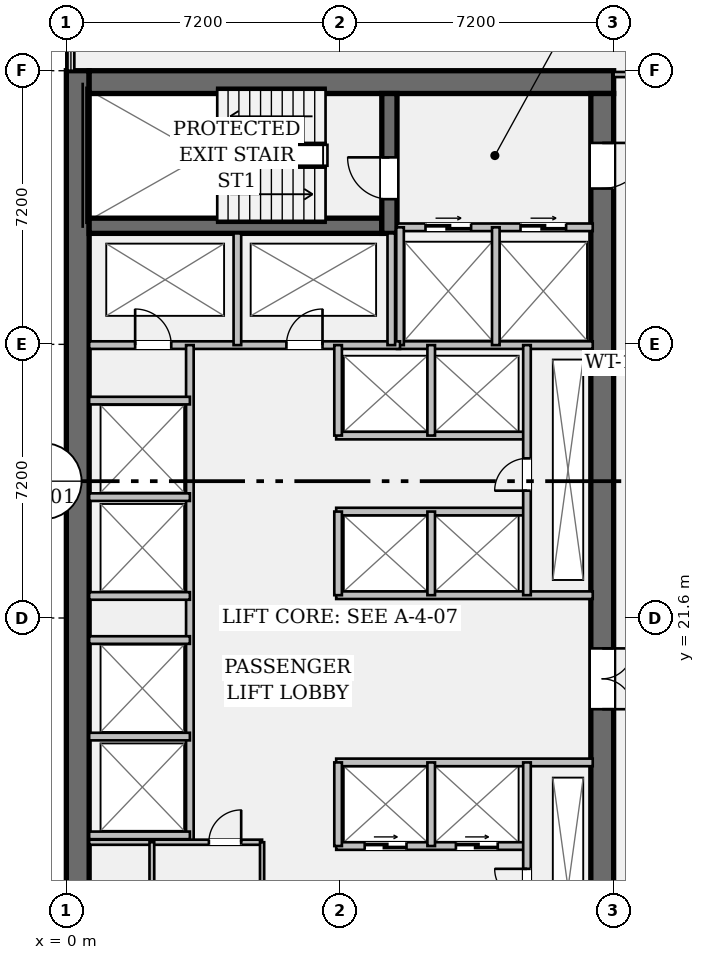
"""IFC4 building model, lengths in metres.
Left out: names, types, materials, properties, quantities, classifications, styles, units other than length and angle.
Written with IfcOpenShell. Run it as: python <this file> out.ifc"""

import sys

from ifc_helpers import new_model, si_unit, direction, frame, frame_2d, origin, place, context, subcontext, project, spatial, rectangle, extrude, element, fill, save


model = new_model("IFC4")
c1 = context("Model", 3, precision=1e-05, world=origin(), true_north=direction((0.0, 1.0)))
c2 = subcontext(c1, "Body", "Model", "MODEL_VIEW")
j1 = project(units=[si_unit("LENGTHUNIT", "METRE"), si_unit("PLANEANGLEUNIT", "RADIAN")], contexts=[c1])
p1 = place(None, origin())
s1 = spatial("IfcSite", under=j1, at=p1, CompositionType="ELEMENT")
p2 = place(p1, origin())
s2 = spatial("IfcBuilding", under=s1, at=p2, CompositionType="ELEMENT")
p3 = place(p2, frame((0.0, 0.0, 102.2)))
s3 = spatial("IfcBuildingStorey", under=s2, at=p3, CompositionType="ELEMENT", Elevation=102.2)
p4 = place(p3, frame((0.3, 7.2, 0.0), z_axis=(0.0, 0.0, 1.0), x_axis=(0.0, 1.0, 0.0)))
e1 = element("IfcWall", 1, at=p4, inside=s3, PredefinedType="SHEAR", context=c2, shape_type="SweptSolid", body=[
    extrude(rectangle(XDim=28.8, YDim=0.6, at=frame_2d((14.4, 0.0))), origin(), (0.0, 0.0, 1.0), 3.58),
])
p5 = place(p3, frame((0.6, 35.7, 0.0), z_axis=(0.0, 0.0, 1.0), x_axis=(1.0, 0.0, 0.0)))
e2 = element("IfcWall", 2, at=p5, inside=s3, PredefinedType="SHEAR", context=c2, shape_type="SweptSolid", body=[
    extrude(rectangle(XDim=13.8, YDim=0.6, at=frame_2d((6.9, 0.0))), origin(), (0.0, 0.0, 1.0), 3.58),
])
p6 = place(p3, frame((14.1, 35.4, 0.0), z_axis=(0.0, 0.0, 1.0), x_axis=(0.0, -1.0, 0.0)))
e3 = element("IfcWall", 3, at=p6, inside=s3, PredefinedType="SHEAR", context=c2, shape_type="SweptSolid", body=[
    extrude(rectangle(XDim=27.6, YDim=0.6, at=frame_2d((13.8, 0.0))), origin(), (0.0, 0.0, 1.0), 3.58),
])
p7 = place(p6, frame((1.3, 0.0, 0.0)))
e4 = element("IfcOpeningElement", 4, at=p7, cuts=e3, PredefinedType="OPENING", context=c2, shape_type="SweptSolid", body=[
    extrude(rectangle(XDim=1.2, YDim=2.15, at=frame_2d((0.6, 1.075))), frame((0.0, 0.312, 0.0), z_axis=(0.0, -1.0, 0.0), x_axis=(1.0, 0.0, 0.0)), (0.0, 0.0, 1.0), 0.624),
])
p8 = place(p6, frame((25.25, 0.0, 0.0)))
e5 = element("IfcOpeningElement", 5, at=p8, cuts=e3, PredefinedType="OPENING", context=c2, shape_type="SweptSolid", body=[
    extrude(rectangle(XDim=1.2, YDim=2.15, at=frame_2d((0.6, 1.075))), frame((0.0, 0.312, 0.0), z_axis=(0.0, -1.0, 0.0), x_axis=(1.0, 0.0, 0.0)), (0.0, 0.0, 1.0), 0.624),
])
p9 = place(p6, frame((14.6, 0.0, 0.0)))
e6 = element("IfcOpeningElement", 6, at=p9, cuts=e3, PredefinedType="OPENING", context=c2, shape_type="SweptSolid", body=[
    extrude(rectangle(XDim=1.6, YDim=2.2, at=frame_2d((0.8, 1.1))), frame((0.0, 0.312, 0.0), z_axis=(0.0, -1.0, 0.0), x_axis=(1.0, 0.0, 0.0)), (0.0, 0.0, 1.0), 0.624),
])
p10 = place(p3, frame((0.6, 31.92, 0.0), z_axis=(0.0, 0.0, 1.0), x_axis=(1.0, 0.0, 0.0)))
e7 = element("IfcWall", 7, at=p10, inside=s3, PredefinedType="SHEAR", context=c2, shape_type="SweptSolid", body=[
    extrude(rectangle(XDim=7.7, YDim=0.4, at=frame_2d((3.85, 0.0))), origin(), (0.0, 0.0, 1.0), 3.58),
])
p11 = place(p3, frame((8.5, 31.72, 0.0), z_axis=(0.0, 0.0, 1.0), x_axis=(0.0, 1.0, 0.0)))
e8 = element("IfcWall", 8, at=p11, inside=s3, PredefinedType="SHEAR", context=c2, shape_type="SweptSolid", body=[
    extrude(rectangle(XDim=3.68, YDim=0.4, at=frame_2d((1.84, 0.0))), origin(), (0.0, 0.0, 1.0), 3.58),
])
p12 = place(p11, frame((0.9, 0.0, 0.0)))
e9 = element("IfcOpeningElement", 9, at=p12, cuts=e8, PredefinedType="OPENING", context=c2, shape_type="SweptSolid", body=[
    extrude(rectangle(XDim=1.1, YDim=2.15, at=frame_2d((0.55, 1.075))), frame((0.0, 0.212, 0.0), z_axis=(0.0, -1.0, 0.0), x_axis=(1.0, 0.0, 0.0)), (0.0, 0.0, 1.0), 0.424),
])
p13 = place(p3, frame((8.7, 31.88, 0.0), z_axis=(0.0, 0.0, 1.0), x_axis=(1.0, 0.0, 0.0)))
e10 = element("IfcWall", 10, at=p13, inside=s3, PredefinedType="PARTITIONING", context=c2, shape_type="SweptSolid", body=[
    extrude(rectangle(XDim=5.15, YDim=0.2, at=frame_2d((2.575, 0.0))), origin(), (0.0, 0.0, 1.0), 3.58),
])
p14 = place(p13, frame((0.75, 0.0, 0.0)))
e11 = element("IfcOpeningElement", 11, at=p14, cuts=e10, PredefinedType="OPENING", context=c2, shape_type="SweptSolid", body=[
    extrude(rectangle(XDim=1.2, YDim=2.2, at=frame_2d((0.6, 1.1))), frame((0.0, 0.112, 0.0), z_axis=(0.0, -1.0, 0.0), x_axis=(1.0, 0.0, 0.0)), (0.0, 0.0, 1.0), 0.224),
])
p15 = place(p13, frame((3.25, 0.0, 0.0)))
e12 = element("IfcOpeningElement", 12, at=p15, cuts=e10, PredefinedType="OPENING", context=c2, shape_type="SweptSolid", body=[
    extrude(rectangle(XDim=1.2, YDim=2.2, at=frame_2d((0.6, 1.1))), frame((0.0, 0.112, 0.0), z_axis=(0.0, -1.0, 0.0), x_axis=(1.0, 0.0, 0.0)), (0.0, 0.0, 1.0), 0.224),
])
p16 = place(p3, frame((8.7, 28.78, 0.0), z_axis=(0.0, 0.0, 1.0), x_axis=(1.0, 0.0, 0.0)))
e13 = element("IfcWall", 13, at=p16, inside=s3, PredefinedType="PARTITIONING", context=c2, shape_type="SweptSolid", body=[
    extrude(rectangle(XDim=5.15, YDim=0.2, at=frame_2d((2.575, 0.0))), origin(), (0.0, 0.0, 1.0), 3.58),
])
for number, where, z_axis, x_axis in (
    (14, (8.78, 28.78, 0.0), (0.0, 0.0, 1.0), (0.0, 1.0, 0.0)),
    (15, (11.3, 28.78, 0.0), (0.0, 0.0, 1.0), (0.0, 1.0, 0.0)),
):
    element("IfcWall", number, at=place(p3, frame(where, z_axis=z_axis, x_axis=x_axis)), inside=s3, PredefinedType="PARTITIONING", context=c2, shape_type="SweptSolid", body=[
        extrude(rectangle(XDim=3.1, YDim=0.2, at=frame_2d((1.55, 0.0))), origin(), (0.0, 0.0, 1.0), 3.58),
    ])
p17 = place(p3, frame((0.6, 28.78, 0.0), z_axis=(0.0, 0.0, 1.0), x_axis=(1.0, 0.0, 0.0)))
e16 = element("IfcWall", 16, at=p17, inside=s3, PredefinedType="PARTITIONING", context=c2, shape_type="SweptSolid", body=[
    extrude(rectangle(XDim=8.18, YDim=0.2, at=frame_2d((4.09, 0.0))), origin(), (0.0, 0.0, 1.0), 3.58),
])
p18 = place(p17, frame((1.21, 0.0, 0.0)))
e17 = element("IfcOpeningElement", 17, at=p18, cuts=e16, PredefinedType="OPENING", context=c2, shape_type="SweptSolid", body=[
    extrude(rectangle(XDim=0.95, YDim=2.15, at=frame_2d((0.475, 1.075))), frame((0.0, 0.112, 0.0), z_axis=(0.0, -1.0, 0.0), x_axis=(1.0, 0.0, 0.0)), (0.0, 0.0, 1.0), 0.224),
])
p19 = place(p17, frame((5.19, 0.0, 0.0)))
e18 = element("IfcOpeningElement", 18, at=p19, cuts=e16, PredefinedType="OPENING", context=c2, shape_type="SweptSolid", body=[
    extrude(rectangle(XDim=0.95, YDim=2.15, at=frame_2d((0.475, 1.075))), frame((0.0, 0.112, 0.0), z_axis=(0.0, -1.0, 0.0), x_axis=(1.0, 0.0, 0.0)), (0.0, 0.0, 1.0), 0.224),
])
for number, where, z_axis, x_axis in (
    (19, (4.5, 28.78, 0.0), (0.0, 0.0, 1.0), (0.0, 1.0, 0.0)),
    (20, (8.55, 28.78, 0.0), (0.0, 0.0, 1.0), (0.0, 1.0, 0.0)),
):
    element("IfcWall", number, at=place(p3, frame(where, z_axis=z_axis, x_axis=x_axis)), inside=s3, PredefinedType="PARTITIONING", context=c2, shape_type="SweptSolid", body=[
        extrude(rectangle(XDim=2.94, YDim=0.2, at=frame_2d((1.47, 0.0))), origin(), (0.0, 0.0, 1.0), 3.58),
    ])
p20 = place(p3, frame((3.25, 15.7, 0.0), z_axis=(0.0, 0.0, 1.0), x_axis=(0.0, 1.0, 0.0)))
e21 = element("IfcWall", 21, at=p20, inside=s3, PredefinedType="PARTITIONING", context=c2, shape_type="SweptSolid", body=[
    extrude(rectangle(XDim=13.08, YDim=0.2, at=frame_2d((6.54, 0.0))), origin(), (0.0, 0.0, 1.0), 3.58),
])
for number, where, z_axis, x_axis in (
    (22, (0.6, 15.88, 0.0), (0.0, 0.0, 1.0), (1.0, 0.0, 0.0)),
    (23, (0.6, 18.48, 0.0), (0.0, 0.0, 1.0), (1.0, 0.0, 0.0)),
    (24, (0.6, 22.18, 0.0), (0.0, 0.0, 1.0), (1.0, 0.0, 0.0)),
    (25, (0.6, 24.78, 0.0), (0.0, 0.0, 1.0), (1.0, 0.0, 0.0)),
    (26, (0.6, 21.02, 0.0), (0.0, 0.0, 1.0), (1.0, 0.0, 0.0)),
    (27, (0.6, 27.32, 0.0), (0.0, 0.0, 1.0), (1.0, 0.0, 0.0)),
):
    element("IfcWall", number, at=place(p3, frame(where, z_axis=z_axis, x_axis=x_axis)), inside=s3, PredefinedType="PARTITIONING", context=c2, shape_type="SweptSolid", body=[
        extrude(rectangle(XDim=2.65, YDim=0.2, at=frame_2d((1.325, 0.0))), origin(), (0.0, 0.0, 1.0), 3.58),
    ])
p21 = place(p3, frame((7.1, 22.2, 0.0), z_axis=(0.0, 0.0, 1.0), x_axis=(1.0, 0.0, 0.0)))
e28 = element("IfcWall", 28, at=p21, inside=s3, PredefinedType="PARTITIONING", context=c2, shape_type="SweptSolid", body=[
    extrude(rectangle(XDim=6.75, YDim=0.2, at=frame_2d((3.375, 0.0))), origin(), (0.0, 0.0, 1.0), 3.58),
])
for number, where, z_axis, x_axis in (
    (29, (7.1, 24.4, 0.0), (0.0, 0.0, 1.0), (1.0, 0.0, 0.0)),
    (30, (7.1, 26.4, 0.0), (0.0, 0.0, 1.0), (1.0, 0.0, 0.0)),
):
    element("IfcWall", number, at=place(p3, frame(where, z_axis=z_axis, x_axis=x_axis)), inside=s3, PredefinedType="PARTITIONING", context=c2, shape_type="SweptSolid", body=[
        extrude(rectangle(XDim=5.02, YDim=0.2, at=frame_2d((2.51, 0.0))), origin(), (0.0, 0.0, 1.0), 3.58),
    ])
p22 = place(p3, frame((7.15, 22.2, 0.0), z_axis=(0.0, 0.0, 1.0), x_axis=(0.0, 1.0, 0.0)))
e31 = element("IfcWall", 31, at=p22, inside=s3, PredefinedType="PARTITIONING", context=c2, shape_type="SweptSolid", body=[
    extrude(rectangle(XDim=2.2, YDim=0.2, at=frame_2d((1.1, 0.0))), origin(), (0.0, 0.0, 1.0), 3.58),
])
p23 = place(p3, frame((7.15, 26.4, 0.0), z_axis=(0.0, 0.0, 1.0), x_axis=(0.0, 1.0, 0.0)))
e32 = element("IfcWall", 32, at=p23, inside=s3, PredefinedType="PARTITIONING", context=c2, shape_type="SweptSolid", body=[
    extrude(rectangle(XDim=2.38, YDim=0.2, at=frame_2d((1.19, 0.0))), origin(), (0.0, 0.0, 1.0), 3.58),
])
p24 = place(p3, frame((9.6, 22.2, 0.0), z_axis=(0.0, 0.0, 1.0), x_axis=(0.0, 1.0, 0.0)))
e33 = element("IfcWall", 33, at=p24, inside=s3, PredefinedType="PARTITIONING", context=c2, shape_type="SweptSolid", body=[
    extrude(rectangle(XDim=2.2, YDim=0.2, at=frame_2d((1.1, 0.0))), origin(), (0.0, 0.0, 1.0), 3.58),
])
p25 = place(p3, frame((9.6, 26.4, 0.0), z_axis=(0.0, 0.0, 1.0), x_axis=(0.0, 1.0, 0.0)))
e34 = element("IfcWall", 34, at=p25, inside=s3, PredefinedType="PARTITIONING", context=c2, shape_type="SweptSolid", body=[
    extrude(rectangle(XDim=2.38, YDim=0.2, at=frame_2d((1.19, 0.0))), origin(), (0.0, 0.0, 1.0), 3.58),
])
p26 = place(p3, frame((12.12, 22.2, 0.0), z_axis=(0.0, 0.0, 1.0), x_axis=(0.0, 1.0, 0.0)))
e35 = element("IfcWall", 35, at=p26, inside=s3, PredefinedType="PARTITIONING", context=c2, shape_type="SweptSolid", body=[
    extrude(rectangle(XDim=6.58, YDim=0.2, at=frame_2d((3.29, 0.0))), origin(), (0.0, 0.0, 1.0), 3.58),
])
p27 = place(p26, frame((2.75, 0.0, 0.0)))
e36 = element("IfcOpeningElement", 36, at=p27, cuts=e35, PredefinedType="OPENING", context=c2, shape_type="SweptSolid", body=[
    extrude(rectangle(XDim=0.85, YDim=2.15, at=frame_2d((0.425, 1.075))), frame((0.0, 0.112, 0.0), z_axis=(0.0, -1.0, 0.0), x_axis=(1.0, 0.0, 0.0)), (0.0, 0.0, 1.0), 0.224),
])
p28 = place(p3, frame((7.1, 17.8, 0.0), z_axis=(0.0, 0.0, 1.0), x_axis=(1.0, 0.0, 0.0)))
e37 = element("IfcWall", 37, at=p28, inside=s3, PredefinedType="PARTITIONING", context=c2, shape_type="SweptSolid", body=[
    extrude(rectangle(XDim=6.75, YDim=0.2, at=frame_2d((3.375, 0.0))), origin(), (0.0, 0.0, 1.0), 3.58),
])
p29 = place(p3, frame((7.1, 15.6, 0.0), z_axis=(0.0, 0.0, 1.0), x_axis=(1.0, 0.0, 0.0)))
e38 = element("IfcWall", 38, at=p29, inside=s3, PredefinedType="PARTITIONING", context=c2, shape_type="SweptSolid", body=[
    extrude(rectangle(XDim=5.02, YDim=0.2, at=frame_2d((2.51, 0.0))), origin(), (0.0, 0.0, 1.0), 3.58),
])
p30 = place(p29, frame((0.75, 0.0, 0.0)))
e39 = element("IfcOpeningElement", 39, at=p30, cuts=e38, PredefinedType="OPENING", context=c2, shape_type="SweptSolid", body=[
    extrude(rectangle(XDim=1.1, YDim=2.2, at=frame_2d((0.55, 1.1))), frame((0.0, 0.112, 0.0), z_axis=(0.0, -1.0, 0.0), x_axis=(1.0, 0.0, 0.0)), (0.0, 0.0, 1.0), 0.224),
])
p31 = place(p29, frame((3.15, 0.0, 0.0)))
e40 = element("IfcOpeningElement", 40, at=p31, cuts=e38, PredefinedType="OPENING", context=c2, shape_type="SweptSolid", body=[
    extrude(rectangle(XDim=1.1, YDim=2.2, at=frame_2d((0.55, 1.1))), frame((0.0, 0.112, 0.0), z_axis=(0.0, -1.0, 0.0), x_axis=(1.0, 0.0, 0.0)), (0.0, 0.0, 1.0), 0.224),
])
for number, where, z_axis, x_axis in (
    (41, (7.15, 15.6, 0.0), (0.0, 0.0, 1.0), (0.0, 1.0, 0.0)),
    (42, (9.6, 15.6, 0.0), (0.0, 0.0, 1.0), (0.0, 1.0, 0.0)),
):
    element("IfcWall", number, at=place(p3, frame(where, z_axis=z_axis, x_axis=x_axis)), inside=s3, PredefinedType="PARTITIONING", context=c2, shape_type="SweptSolid", body=[
        extrude(rectangle(XDim=2.2, YDim=0.2, at=frame_2d((1.1, 0.0))), origin(), (0.0, 0.0, 1.0), 3.58),
    ])
p32 = place(p3, frame((12.12, 11.2, 0.0), z_axis=(0.0, 0.0, 1.0), x_axis=(0.0, 1.0, 0.0)))
e43 = element("IfcWall", 43, at=p32, inside=s3, PredefinedType="PARTITIONING", context=c2, shape_type="SweptSolid", body=[
    extrude(rectangle(XDim=6.6, YDim=0.2, at=frame_2d((3.3, 0.0))), origin(), (0.0, 0.0, 1.0), 3.58),
])
p33 = place(p32, frame((2.95, 0.0, 0.0)))
e44 = element("IfcOpeningElement", 44, at=p33, cuts=e43, PredefinedType="OPENING", context=c2, shape_type="SweptSolid", body=[
    extrude(rectangle(XDim=0.85, YDim=2.15, at=frame_2d((0.425, 1.075))), frame((0.0, 0.112, 0.0), z_axis=(0.0, -1.0, 0.0), x_axis=(1.0, 0.0, 0.0)), (0.0, 0.0, 1.0), 0.224),
])
p34 = place(p3, frame((0.6, 15.7, 0.0), z_axis=(0.0, 0.0, 1.0), x_axis=(1.0, 0.0, 0.0)))
e45 = element("IfcWall", 45, at=p34, inside=s3, PredefinedType="PARTITIONING", context=c2, shape_type="SweptSolid", body=[
    extrude(rectangle(XDim=4.55, YDim=0.135, at=frame_2d((2.275, 0.0))), origin(), (0.0, 0.0, 1.0), 3.58),
])
p35 = place(p34, frame((3.15, 0.0, 0.0)))
e46 = element("IfcOpeningElement", 46, at=p35, cuts=e45, PredefinedType="OPENING", context=c2, shape_type="SweptSolid", body=[
    extrude(rectangle(XDim=0.85, YDim=2.15, at=frame_2d((0.425, 1.075))), frame((0.0, 0.08, 0.0), z_axis=(0.0, -1.0, 0.0), x_axis=(1.0, 0.0, 0.0)), (0.0, 0.0, 1.0), 0.159),
])
p36 = place(p3, frame((5.15, 11.28, 0.0), z_axis=(0.0, 0.0, 1.0), x_axis=(0.0, 1.0, 0.0)))
e47 = element("IfcWall", 47, at=p36, inside=s3, PredefinedType="PARTITIONING", context=c2, shape_type="SweptSolid", body=[
    extrude(rectangle(XDim=4.42, YDim=0.11, at=frame_2d((2.21, 0.0))), origin(), (0.0, 0.0, 1.0), 3.58),
])
p37 = place(p3, frame((2.25, 11.28, 0.0), z_axis=(0.0, 0.0, 1.0), x_axis=(0.0, 1.0, 0.0)))
e48 = element("IfcWall", 48, at=p37, inside=s3, PredefinedType="PARTITIONING", context=c2, shape_type="SweptSolid", body=[
    extrude(rectangle(XDim=4.42, YDim=0.125, at=frame_2d((2.21, 0.0))), origin(), (0.0, 0.0, 1.0), 3.58),
])
p38 = place(p37, frame((1.65, 0.0, 0.0)))
e49 = element("IfcOpeningElement", 49, at=p38, cuts=e48, PredefinedType="OPENING", context=c2, shape_type="SweptSolid", body=[
    extrude(rectangle(XDim=0.85, YDim=2.15, at=frame_2d((0.425, 1.075))), frame((0.0, 0.074, 0.0), z_axis=(0.0, -1.0, 0.0), x_axis=(1.0, 0.0, 0.0)), (0.0, 0.0, 1.0), 0.149),
])
p39 = place(p3, frame((14.4, 35.9, 0.0), z_axis=(0.0, 0.0, 1.0), x_axis=(1.0, 0.0, 0.0)))
e50 = element("IfcWall", 50, at=p39, inside=s3, PredefinedType="PARTITIONING", context=c2, shape_type="SweptSolid", body=[
    extrude(rectangle(XDim=2.95, YDim=0.135, at=frame_2d((1.475, 0.0))), origin(), (0.0, 0.0, 1.0), 2.793),
])
p40 = place(p39, frame((0.95, 0.0, 0.0)))
e51 = element("IfcOpeningElement", 51, at=p40, cuts=e50, PredefinedType="OPENING", context=c2, shape_type="SweptSolid", body=[
    extrude(rectangle(XDim=1.0, YDim=2.15, at=frame_2d((0.5, 1.075))), frame((0.0, 0.08, 0.0), z_axis=(0.0, -1.0, 0.0), x_axis=(1.0, 0.0, 0.0)), (0.0, 0.0, 1.0), 0.159),
])
p41 = place(p12, origin())
e52 = element("IfcDoor", 52, at=p41, inside=s3, OperationType="SINGLE_SWING_RIGHT", PredefinedType="DOOR", context=c2, shape_type="SweptSolid", body=[
    extrude(rectangle(XDim=1.1, YDim=2.15, at=frame_2d((0.55, 1.075))), frame((0.0, 0.025, 0.0), z_axis=(0.0, -1.0, 0.0), x_axis=(1.0, 0.0, 0.0)), (0.0, 0.0, 1.0), 0.05),
])
fill(e9, e52)
p42 = place(p7, origin())
e53 = element("IfcDoor", 53, at=p42, inside=s3, OperationType="SINGLE_SWING_LEFT", PredefinedType="DOOR", context=c2, shape_type="SweptSolid", body=[
    extrude(rectangle(XDim=1.2, YDim=2.15, at=frame_2d((0.6, 1.075))), frame((0.0, 0.025, 0.0), z_axis=(0.0, -1.0, 0.0), x_axis=(1.0, 0.0, 0.0)), (0.0, 0.0, 1.0), 0.05),
])
fill(e4, e53)
p43 = place(p14, origin())
e54 = element("IfcDoor", 54, at=p43, inside=s3, OperationType="DOUBLE_DOOR_SLIDING", PredefinedType="DOOR", context=c2, shape_type="SweptSolid", body=[
    extrude(rectangle(XDim=1.2, YDim=2.2, at=frame_2d((0.6, 1.1))), frame((0.0, 0.025, 0.0), z_axis=(0.0, -1.0, 0.0), x_axis=(1.0, 0.0, 0.0)), (0.0, 0.0, 1.0), 0.05),
])
fill(e11, e54)
p44 = place(p15, origin())
e55 = element("IfcDoor", 55, at=p44, inside=s3, OperationType="DOUBLE_DOOR_SLIDING", PredefinedType="DOOR", context=c2, shape_type="SweptSolid", body=[
    extrude(rectangle(XDim=1.2, YDim=2.2, at=frame_2d((0.6, 1.1))), frame((0.0, 0.025, 0.0), z_axis=(0.0, -1.0, 0.0), x_axis=(1.0, 0.0, 0.0)), (0.0, 0.0, 1.0), 0.05),
])
fill(e12, e55)
p45 = place(p18, origin())
e56 = element("IfcDoor", 56, at=p45, inside=s3, OperationType="SINGLE_SWING_LEFT", PredefinedType="DOOR", context=c2, shape_type="SweptSolid", body=[
    extrude(rectangle(XDim=0.95, YDim=2.15, at=frame_2d((0.475, 1.075))), frame((0.0, 0.025, 0.0), z_axis=(0.0, -1.0, 0.0), x_axis=(1.0, 0.0, 0.0)), (0.0, 0.0, 1.0), 0.05),
])
fill(e17, e56)
p46 = place(p19, origin())
e57 = element("IfcDoor", 57, at=p46, inside=s3, OperationType="SINGLE_SWING_RIGHT", PredefinedType="DOOR", context=c2, shape_type="SweptSolid", body=[
    extrude(rectangle(XDim=0.95, YDim=2.15, at=frame_2d((0.475, 1.075))), frame((0.0, 0.025, 0.0), z_axis=(0.0, -1.0, 0.0), x_axis=(1.0, 0.0, 0.0)), (0.0, 0.0, 1.0), 0.05),
])
fill(e18, e57)
p47 = place(p9, origin())
e58 = element("IfcDoor", 58, at=p47, inside=s3, OperationType="DOUBLE_DOOR_SINGLE_SWING", PredefinedType="DOOR", context=c2, shape_type="SweptSolid", body=[
    extrude(rectangle(XDim=1.6, YDim=2.2, at=frame_2d((0.8, 1.1))), frame((0.0, 0.025, 0.0), z_axis=(0.0, -1.0, 0.0), x_axis=(1.0, 0.0, 0.0)), (0.0, 0.0, 1.0), 0.05),
])
fill(e6, e58)
p48 = place(p27, origin())
e59 = element("IfcDoor", 59, at=p48, inside=s3, OperationType="SINGLE_SWING_LEFT", PredefinedType="DOOR", context=c2, shape_type="SweptSolid", body=[
    extrude(rectangle(XDim=0.85, YDim=2.15, at=frame_2d((0.425, 1.075))), frame((0.0, 0.025, 0.0), z_axis=(0.0, -1.0, 0.0), x_axis=(1.0, 0.0, 0.0)), (0.0, 0.0, 1.0), 0.05),
])
fill(e36, e59)
p49 = place(p33, origin())
e60 = element("IfcDoor", 60, at=p49, inside=s3, OperationType="SINGLE_SWING_RIGHT", PredefinedType="DOOR", context=c2, shape_type="SweptSolid", body=[
    extrude(rectangle(XDim=0.85, YDim=2.15, at=frame_2d((0.425, 1.075))), frame((0.0, 0.025, 0.0), z_axis=(0.0, -1.0, 0.0), x_axis=(1.0, 0.0, 0.0)), (0.0, 0.0, 1.0), 0.05),
])
fill(e44, e60)
p50 = place(p30, origin())
e61 = element("IfcDoor", 61, at=p50, inside=s3, OperationType="DOUBLE_DOOR_SLIDING", PredefinedType="DOOR", context=c2, shape_type="SweptSolid", body=[
    extrude(rectangle(XDim=1.1, YDim=2.2, at=frame_2d((0.55, 1.1))), frame((0.0, 0.025, 0.0), z_axis=(0.0, -1.0, 0.0), x_axis=(1.0, 0.0, 0.0)), (0.0, 0.0, 1.0), 0.05),
])
fill(e39, e61)
p51 = place(p31, origin())
e62 = element("IfcDoor", 62, at=p51, inside=s3, OperationType="DOUBLE_DOOR_SLIDING", PredefinedType="DOOR", context=c2, shape_type="SweptSolid", body=[
    extrude(rectangle(XDim=1.1, YDim=2.2, at=frame_2d((0.55, 1.1))), frame((0.0, 0.025, 0.0), z_axis=(0.0, -1.0, 0.0), x_axis=(1.0, 0.0, 0.0)), (0.0, 0.0, 1.0), 0.05),
])
fill(e40, e62)
p52 = place(p35, origin())
e63 = element("IfcDoor", 63, at=p52, inside=s3, OperationType="SINGLE_SWING_RIGHT", PredefinedType="DOOR", context=c2, shape_type="SweptSolid", body=[
    extrude(rectangle(XDim=0.85, YDim=2.15, at=frame_2d((0.425, 1.075))), frame((0.0, 0.025, 0.0), z_axis=(0.0, -1.0, 0.0), x_axis=(1.0, 0.0, 0.0)), (0.0, 0.0, 1.0), 0.05),
])
fill(e46, e63)
save(model, sys.argv[1])
